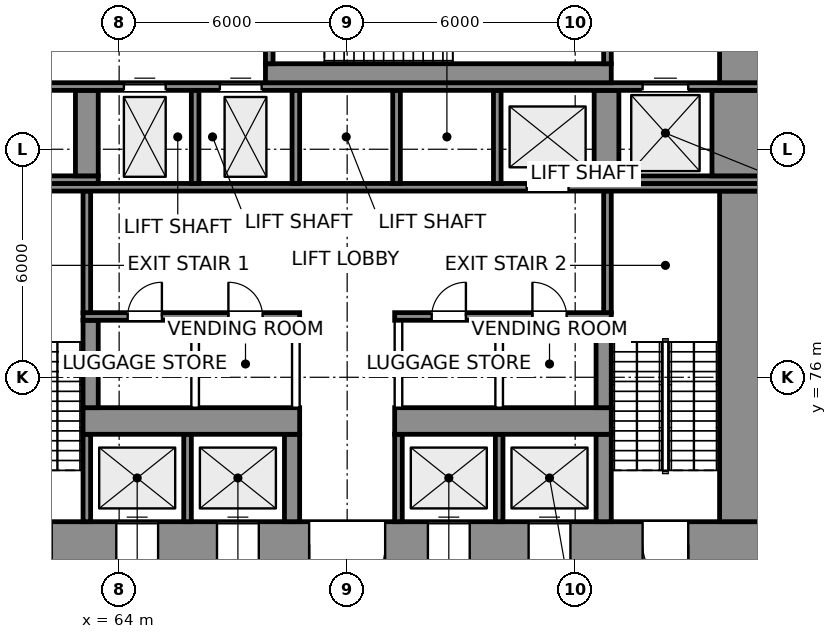
"""IFC4 building model, lengths in metres.
Left out: names, types, materials, properties, quantities, classifications, styles, units other than length and angle.
Written with IfcOpenShell. Run it as: python <this file> out.ifc"""

import sys

from ifc_helpers import new_model, si_unit, direction, frame, frame_2d, origin, place, context, subcontext, project, spatial, rectangle, extrude, element, fill, save


model = new_model("IFC4")
c1 = context("Model", 3, precision=1e-05, world=origin(), true_north=direction((0.0, 1.0)))
c2 = subcontext(c1, "Body", "Model", "MODEL_VIEW")
j1 = project(units=[si_unit("LENGTHUNIT", "METRE"), si_unit("PLANEANGLEUNIT", "RADIAN")], contexts=[c1])
p1 = place(None, origin())
s1 = spatial("IfcSite", under=j1, at=p1, CompositionType="ELEMENT")
p2 = place(p1, origin())
s2 = spatial("IfcBuilding", under=s1, at=p2, CompositionType="ELEMENT")
p3 = place(p2, frame((0.0, 0.0, 34.0)))
s3 = spatial("IfcBuildingStorey", under=s2, at=p3, CompositionType="ELEMENT", Elevation=34.0)
p4 = place(p3, frame((59.0, 71.6, 0.0), z_axis=(0.0, 0.0, 1.0), x_axis=(1.0, 0.0, 0.0)))
e1 = element("IfcWall", 1, at=p4, inside=s3, PredefinedType="SHEAR", context=c2, shape_type="SweptSolid", body=[
    extrude(rectangle(XDim=22.0, YDim=1.2, at=frame_2d((11.0, 0.0))), origin(), (0.0, 0.0, 1.0), 5.0),
])
p5 = place(p4, frame((2.025, 0.0, 0.0)))
e2 = element("IfcOpeningElement", 2, at=p5, cuts=e1, PredefinedType="OPENING", context=c2, shape_type="SweptSolid", body=[
    extrude(rectangle(XDim=1.2, YDim=2.1, at=frame_2d((0.6, 1.05))), frame((0.0, 0.61, 0.0), z_axis=(0.0, -1.0, 0.0), x_axis=(1.0, 0.0, 0.0)), (0.0, 0.0, 1.0), 1.22),
])
p6 = place(p4, frame((18.775, 0.0, 0.0)))
e3 = element("IfcOpeningElement", 3, at=p6, cuts=e1, PredefinedType="OPENING", context=c2, shape_type="SweptSolid", body=[
    extrude(rectangle(XDim=1.2, YDim=2.1, at=frame_2d((0.6, 1.05))), frame((0.0, 0.61, 0.0), z_axis=(0.0, -1.0, 0.0), x_axis=(1.0, 0.0, 0.0)), (0.0, 0.0, 1.0), 1.22),
])
p7 = place(p4, frame((10.0, 0.0, 0.0)))
e4 = element("IfcOpeningElement", 4, at=p7, cuts=e1, PredefinedType="OPENING", context=c2, shape_type="SweptSolid", body=[
    extrude(rectangle(XDim=2.0, YDim=2.1, at=frame_2d((1.0, 1.05))), frame((0.0, 0.61, 0.0), z_axis=(0.0, -1.0, 0.0), x_axis=(1.0, 0.0, 0.0)), (0.0, 0.0, 1.0), 1.22),
])
p8 = place(p4, frame((4.925, 0.0, 0.0)))
e5 = element("IfcOpeningElement", 5, at=p8, cuts=e1, PredefinedType="OPENING", context=c2, shape_type="SweptSolid", body=[
    extrude(rectangle(XDim=1.1, YDim=2.1, at=frame_2d((0.55, 1.05))), frame((0.0, 0.61, 0.0), z_axis=(0.0, -1.0, 0.0), x_axis=(1.0, 0.0, 0.0)), (0.0, 0.0, 1.0), 1.22),
])
p9 = place(p4, frame((7.575, 0.0, 0.0)))
e6 = element("IfcOpeningElement", 6, at=p9, cuts=e1, PredefinedType="OPENING", context=c2, shape_type="SweptSolid", body=[
    extrude(rectangle(XDim=1.1, YDim=2.1, at=frame_2d((0.55, 1.05))), frame((0.0, 0.61, 0.0), z_axis=(0.0, -1.0, 0.0), x_axis=(1.0, 0.0, 0.0)), (0.0, 0.0, 1.0), 1.22),
])
p10 = place(p4, frame((13.125, 0.0, 0.0)))
e7 = element("IfcOpeningElement", 7, at=p10, cuts=e1, PredefinedType="OPENING", context=c2, shape_type="SweptSolid", body=[
    extrude(rectangle(XDim=1.1, YDim=2.1, at=frame_2d((0.55, 1.05))), frame((0.0, 0.61, 0.0), z_axis=(0.0, -1.0, 0.0), x_axis=(1.0, 0.0, 0.0)), (0.0, 0.0, 1.0), 1.22),
])
p11 = place(p4, frame((15.775, 0.0, 0.0)))
e8 = element("IfcOpeningElement", 8, at=p11, cuts=e1, PredefinedType="OPENING", context=c2, shape_type="SweptSolid", body=[
    extrude(rectangle(XDim=1.1, YDim=2.1, at=frame_2d((0.55, 1.05))), frame((0.0, 0.61, 0.0), z_axis=(0.0, -1.0, 0.0), x_axis=(1.0, 0.0, 0.0)), (0.0, 0.0, 1.0), 1.22),
])
for number, where, z_axis, x_axis in (
    (9, (63.15, 72.2, 0.0), (0.0, 0.0, 1.0), (0.0, 1.0, 0.0)),
    (10, (65.8, 72.2, 0.0), (0.0, 0.0, 1.0), (0.0, 1.0, 0.0)),
):
    element("IfcWall", number, at=place(p3, frame(where, z_axis=z_axis, x_axis=x_axis)), inside=s3, PredefinedType="SHEAR", context=c2, shape_type="SweptSolid", body=[
        extrude(rectangle(XDim=2.3, YDim=0.2, at=frame_2d((1.15, 0.0))), origin(), (0.0, 0.0, 1.0), 5.0),
    ])
p12 = place(p3, frame((68.55, 72.2, 0.0), z_axis=(0.0, 0.0, 1.0), x_axis=(0.0, 1.0, 0.0)))
e11 = element("IfcWall", 11, at=p12, inside=s3, PredefinedType="SHEAR", context=c2, shape_type="SweptSolid", body=[
    extrude(rectangle(XDim=2.3, YDim=0.4, at=frame_2d((1.15, 0.0))), origin(), (0.0, 0.0, 1.0), 5.0),
])
for number, where, z_axis, x_axis in (
    (12, (71.35, 72.2, 0.0), (0.0, 0.0, 1.0), (0.0, 1.0, 0.0)),
    (13, (74.0, 72.2, 0.0), (0.0, 0.0, 1.0), (0.0, 1.0, 0.0)),
):
    element("IfcWall", number, at=place(p3, frame(where, z_axis=z_axis, x_axis=x_axis)), inside=s3, PredefinedType="SHEAR", context=c2, shape_type="SweptSolid", body=[
        extrude(rectangle(XDim=2.3, YDim=0.2, at=frame_2d((1.15, 0.0))), origin(), (0.0, 0.0, 1.0), 5.0),
    ])
p13 = place(p3, frame((76.75, 72.2, 0.0), z_axis=(0.0, 0.0, 1.0), x_axis=(0.0, 1.0, 0.0)))
e14 = element("IfcWall", 14, at=p13, inside=s3, PredefinedType="SHEAR", context=c2, shape_type="SweptSolid", body=[
    extrude(rectangle(XDim=2.3, YDim=0.4, at=frame_2d((1.15, 0.0))), origin(), (0.0, 0.0, 1.0), 5.0),
])
p14 = place(p3, frame((80.4, 72.2, 0.0), z_axis=(0.0, 0.0, 1.0), x_axis=(0.0, 1.0, 0.0)))
e15 = element("IfcWall", 15, at=p14, inside=s3, PredefinedType="SHEAR", context=c2, shape_type="SweptSolid", body=[
    extrude(rectangle(XDim=8.7, YDim=1.2, at=frame_2d((4.35, 0.0))), origin(), (0.0, 0.0, 1.0), 5.0),
])
for number, where, z_axis, x_axis in (
    (16, (63.05, 74.85, 0.0), (0.0, 0.0, 1.0), (1.0, 0.0, 0.0)),
    (17, (71.25, 74.85, 0.0), (0.0, 0.0, 1.0), (1.0, 0.0, 0.0)),
):
    element("IfcWall", number, at=place(p3, frame(where, z_axis=z_axis, x_axis=x_axis)), inside=s3, PredefinedType="SHEAR", context=c2, shape_type="SweptSolid", body=[
        extrude(rectangle(XDim=5.7, YDim=0.7, at=frame_2d((2.85, 0.0))), origin(), (0.0, 0.0, 1.0), 5.0),
    ])
p15 = place(p3, frame((63.25, 75.2, 0.0), z_axis=(0.0, 0.0, 1.0), x_axis=(0.0, 1.0, 0.0)))
e18 = element("IfcWall", 18, at=p15, inside=s3, PredefinedType="SHEAR", context=c2, shape_type="SweptSolid", body=[
    extrude(rectangle(XDim=2.3, YDim=0.4, at=frame_2d((1.15, 0.0))), origin(), (0.0, 0.0, 1.0), 5.0),
])
for number, where, z_axis, x_axis in (
    (19, (66.0, 75.2, 0.0), (0.0, 0.0, 1.0), (0.0, 1.0, 0.0)),
    (20, (68.65, 75.2, 0.0), (0.0, 0.0, 1.0), (0.0, 1.0, 0.0)),
    (21, (71.35, 75.2, 0.0), (0.0, 0.0, 1.0), (0.0, 1.0, 0.0)),
    (22, (74.0, 75.2, 0.0), (0.0, 0.0, 1.0), (0.0, 1.0, 0.0)),
):
    element("IfcWall", number, at=place(p3, frame(where, z_axis=z_axis, x_axis=x_axis)), inside=s3, PredefinedType="PARTITIONING", context=c2, shape_type="SweptSolid", body=[
        extrude(rectangle(XDim=2.3, YDim=0.2, at=frame_2d((1.15, 0.0))), origin(), (0.0, 0.0, 1.0), 4.6),
    ])
p16 = place(p3, frame((76.75, 75.2, 0.0), z_axis=(0.0, 0.0, 1.0), x_axis=(0.0, 1.0, 0.0)))
e23 = element("IfcWall", 23, at=p16, inside=s3, PredefinedType="SHEAR", context=c2, shape_type="SweptSolid", body=[
    extrude(rectangle(XDim=2.3, YDim=0.4, at=frame_2d((1.15, 0.0))), origin(), (0.0, 0.0, 1.0), 5.0),
])
p17 = place(p3, frame((63.05, 77.6, 0.0), z_axis=(0.0, 0.0, 1.0), x_axis=(1.0, 0.0, 0.0)))
e24 = element("IfcWall", 24, at=p17, inside=s3, PredefinedType="SHEAR", context=c2, shape_type="SweptSolid", body=[
    extrude(rectangle(XDim=5.7, YDim=0.2, at=frame_2d((2.85, 0.0))), origin(), (0.0, 0.0, 1.0), 5.0),
])
p18 = place(p17, frame((1.175, 0.0, 0.0)))
e25 = element("IfcOpeningElement", 25, at=p18, cuts=e24, PredefinedType="OPENING", context=c2, shape_type="SweptSolid", body=[
    extrude(rectangle(XDim=0.9, YDim=2.1, at=frame_2d((0.45, 1.05))), frame((0.0, 0.11, 0.0), z_axis=(0.0, -1.0, 0.0), x_axis=(1.0, 0.0, 0.0)), (0.0, 0.0, 1.0), 0.22),
])
p19 = place(p17, frame((3.825, 0.0, 0.0)))
e26 = element("IfcOpeningElement", 26, at=p19, cuts=e24, PredefinedType="OPENING", context=c2, shape_type="SweptSolid", body=[
    extrude(rectangle(XDim=0.9, YDim=2.1, at=frame_2d((0.45, 1.05))), frame((0.0, 0.11, 0.0), z_axis=(0.0, -1.0, 0.0), x_axis=(1.0, 0.0, 0.0)), (0.0, 0.0, 1.0), 0.22),
])
p20 = place(p3, frame((71.25, 77.6, 0.0), z_axis=(0.0, 0.0, 1.0), x_axis=(1.0, 0.0, 0.0)))
e27 = element("IfcWall", 27, at=p20, inside=s3, PredefinedType="SHEAR", context=c2, shape_type="SweptSolid", body=[
    extrude(rectangle(XDim=5.7, YDim=0.2, at=frame_2d((2.85, 0.0))), origin(), (0.0, 0.0, 1.0), 5.0),
])
p21 = place(p20, frame((0.975, 0.0, 0.0)))
e28 = element("IfcOpeningElement", 28, at=p21, cuts=e27, PredefinedType="OPENING", context=c2, shape_type="SweptSolid", body=[
    extrude(rectangle(XDim=0.9, YDim=2.1, at=frame_2d((0.45, 1.05))), frame((0.0, 0.11, 0.0), z_axis=(0.0, -1.0, 0.0), x_axis=(1.0, 0.0, 0.0)), (0.0, 0.0, 1.0), 0.22),
])
p22 = place(p20, frame((3.625, 0.0, 0.0)))
e29 = element("IfcOpeningElement", 29, at=p22, cuts=e27, PredefinedType="OPENING", context=c2, shape_type="SweptSolid", body=[
    extrude(rectangle(XDim=0.9, YDim=2.1, at=frame_2d((0.45, 1.05))), frame((0.0, 0.11, 0.0), z_axis=(0.0, -1.0, 0.0), x_axis=(1.0, 0.0, 0.0)), (0.0, 0.0, 1.0), 0.22),
])
for number, where, z_axis, x_axis in (
    (30, (63.15, 77.7, 0.0), (0.0, 0.0, 1.0), (0.0, 1.0, 0.0)),
    (31, (76.85, 77.7, 0.0), (0.0, 0.0, 1.0), (0.0, 1.0, 0.0)),
):
    element("IfcWall", number, at=place(p3, frame(where, z_axis=z_axis, x_axis=x_axis)), inside=s3, PredefinedType="SHEAR", context=c2, shape_type="SweptSolid", body=[
        extrude(rectangle(XDim=3.2, YDim=0.2, at=frame_2d((1.6, 0.0))), origin(), (0.0, 0.0, 1.0), 5.0),
    ])
p23 = place(p3, frame((59.0, 81.0, 0.0), z_axis=(0.0, 0.0, 1.0), x_axis=(1.0, 0.0, 0.0)))
e32 = element("IfcWall", 32, at=p23, inside=s3, PredefinedType="SHEAR", context=c2, shape_type="SweptSolid", body=[
    extrude(rectangle(XDim=22.0, YDim=0.2, at=frame_2d((11.0, 0.0))), origin(), (0.0, 0.0, 1.0), 5.0),
])
p24 = place(p23, frame((15.725, 0.0, 0.0)))
e33 = element("IfcOpeningElement", 33, at=p24, cuts=e32, PredefinedType="OPENING", context=c2, shape_type="SweptSolid", body=[
    extrude(rectangle(XDim=1.1, YDim=2.1, at=frame_2d((0.55, 1.05))), frame((0.0, 0.11, 0.0), z_axis=(0.0, -1.0, 0.0), x_axis=(1.0, 0.0, 0.0)), (0.0, 0.0, 1.0), 0.22),
])
p25 = place(p3, frame((59.0, 81.2, 0.0), z_axis=(0.0, 0.0, 1.0), x_axis=(1.0, 0.0, 0.0)))
e34 = element("IfcWall", 34, at=p25, inside=s3, PredefinedType="SHEAR", context=c2, shape_type="SweptSolid", body=[
    extrude(rectangle(XDim=4.45, YDim=0.2, at=frame_2d((2.225, 0.0))), origin(), (0.0, 0.0, 1.0), 5.0),
])
for number, where, z_axis, x_axis in (
    (35, (66.0, 81.1, 0.0), (0.0, 0.0, 1.0), (0.0, 1.0, 0.0)),
    (36, (68.65, 81.1, 0.0), (0.0, 0.0, 1.0), (0.0, 1.0, 0.0)),
    (37, (71.3, 81.1, 0.0), (0.0, 0.0, 1.0), (0.0, 1.0, 0.0)),
    (38, (73.95, 81.1, 0.0), (0.0, 0.0, 1.0), (0.0, 1.0, 0.0)),
):
    element("IfcWall", number, at=place(p3, frame(where, z_axis=z_axis, x_axis=x_axis)), inside=s3, PredefinedType="SHEAR", context=c2, shape_type="SweptSolid", body=[
        extrude(rectangle(XDim=2.45, YDim=0.2, at=frame_2d((1.225, 0.0))), origin(), (0.0, 0.0, 1.0), 5.0),
    ])
p26 = place(p3, frame((76.5, 81.2, 0.0), z_axis=(0.0, 0.0, 1.0), x_axis=(1.0, 0.0, 0.0)))
e39 = element("IfcWall", 39, at=p26, inside=s3, PredefinedType="SHEAR", context=c2, shape_type="SweptSolid", body=[
    extrude(rectangle(XDim=4.5, YDim=0.2, at=frame_2d((2.25, 0.0))), origin(), (0.0, 0.0, 1.0), 5.0),
])
p27 = place(p3, frame((63.15, 81.3, 0.0), z_axis=(0.0, 0.0, 1.0), x_axis=(0.0, 1.0, 0.0)))
e40 = element("IfcWall", 40, at=p27, inside=s3, PredefinedType="SHEAR", context=c2, shape_type="SweptSolid", body=[
    extrude(rectangle(XDim=2.25, YDim=0.6, at=frame_2d((1.125, 0.0))), origin(), (0.0, 0.0, 1.0), 5.0),
])
p28 = place(p3, frame((76.825, 81.3, 0.0), z_axis=(0.0, 0.0, 1.0), x_axis=(0.0, 1.0, 0.0)))
e41 = element("IfcWall", 41, at=p28, inside=s3, PredefinedType="SHEAR", context=c2, shape_type="SweptSolid", body=[
    extrude(rectangle(XDim=2.25, YDim=0.65, at=frame_2d((1.125, 0.0))), origin(), (0.0, 0.0, 1.0), 5.0),
])
p29 = place(p3, frame((80.3, 81.3, 0.0), z_axis=(0.0, 0.0, 1.0), x_axis=(0.0, 1.0, 0.0)))
e42 = element("IfcWall", 42, at=p29, inside=s3, PredefinedType="SHEAR", context=c2, shape_type="SweptSolid", body=[
    extrude(rectangle(XDim=2.25, YDim=1.4, at=frame_2d((1.125, 0.0))), origin(), (0.0, 0.0, 1.0), 5.0),
])
p30 = place(p3, frame((59.0, 83.65, 0.0), z_axis=(0.0, 0.0, 1.0), x_axis=(1.0, 0.0, 0.0)))
e43 = element("IfcWall", 43, at=p30, inside=s3, PredefinedType="SHEAR", context=c2, shape_type="SweptSolid", body=[
    extrude(rectangle(XDim=22.0, YDim=0.2, at=frame_2d((11.0, 0.0))), origin(), (0.0, 0.0, 1.0), 5.0),
])
p31 = place(p30, frame((5.125, 0.0, 0.0)))
e44 = element("IfcOpeningElement", 44, at=p31, cuts=e43, PredefinedType="OPENING", context=c2, shape_type="SweptSolid", body=[
    extrude(rectangle(XDim=1.1, YDim=2.1, at=frame_2d((0.55, 1.05))), frame((0.0, 0.11, 0.0), z_axis=(0.0, -1.0, 0.0), x_axis=(1.0, 0.0, 0.0)), (0.0, 0.0, 1.0), 0.22),
])
p32 = place(p30, frame((7.65, 0.0, 0.0)))
e45 = element("IfcOpeningElement", 45, at=p32, cuts=e43, PredefinedType="OPENING", context=c2, shape_type="SweptSolid", body=[
    extrude(rectangle(XDim=1.1, YDim=2.1, at=frame_2d((0.55, 1.05))), frame((0.0, 0.11, 0.0), z_axis=(0.0, -1.0, 0.0), x_axis=(1.0, 0.0, 0.0)), (0.0, 0.0, 1.0), 0.22),
])
p33 = place(p30, frame((18.775, 0.0, 0.0)))
e46 = element("IfcOpeningElement", 46, at=p33, cuts=e43, PredefinedType="OPENING", context=c2, shape_type="SweptSolid", body=[
    extrude(rectangle(XDim=1.2, YDim=2.1, at=frame_2d((0.6, 1.05))), frame((0.0, 0.11, 0.0), z_axis=(0.0, -1.0, 0.0), x_axis=(1.0, 0.0, 0.0)), (0.0, 0.0, 1.0), 0.22),
])
p34 = place(p30, frame((2.075, 0.0, 0.0)))
e47 = element("IfcOpeningElement", 47, at=p34, cuts=e43, PredefinedType="OPENING", context=c2, shape_type="SweptSolid", body=[
    extrude(rectangle(XDim=1.1, YDim=2.1, at=frame_2d((0.55, 1.05))), frame((0.0, 0.11, 0.0), z_axis=(0.0, -1.0, 0.0), x_axis=(1.0, 0.0, 0.0)), (0.0, 0.0, 1.0), 0.22),
])
p35 = place(p3, frame((67.85, 84.0, 0.0), z_axis=(0.0, 0.0, 1.0), x_axis=(1.0, 0.0, 0.0)))
e48 = element("IfcWall", 48, at=p35, inside=s3, PredefinedType="SHEAR", context=c2, shape_type="SweptSolid", body=[
    extrude(rectangle(XDim=9.1, YDim=0.5, at=frame_2d((4.55, 0.0))), origin(), (0.0, 0.0, 1.0), 5.0),
])
p36 = place(p3, frame((80.4, 83.75, 0.0), z_axis=(0.0, 0.0, 1.0), x_axis=(0.0, 1.0, 0.0)))
e49 = element("IfcWall", 49, at=p36, inside=s3, PredefinedType="SHEAR", context=c2, shape_type="SweptSolid", body=[
    extrude(rectangle(XDim=3.05, YDim=1.2, at=frame_2d((1.525, 0.0))), origin(), (0.0, 0.0, 1.0), 5.0),
])
p37 = place(p36, frame((0.925, 0.0, 0.0)))
e50 = element("IfcOpeningElement", 50, at=p37, cuts=e49, PredefinedType="OPENING", context=c2, shape_type="SweptSolid", body=[
    extrude(rectangle(XDim=1.2, YDim=2.1, at=frame_2d((0.6, 1.05))), frame((0.0, 0.61, 0.0), z_axis=(0.0, -1.0, 0.0), x_axis=(1.0, 0.0, 0.0)), (0.0, 0.0, 1.0), 1.22),
])
p38 = place(p3, frame((67.95, 84.25, 0.0), z_axis=(0.0, 0.0, 1.0), x_axis=(0.0, 1.0, 0.0)))
e51 = element("IfcWall", 51, at=p38, inside=s3, PredefinedType="SHEAR", context=c2, shape_type="SweptSolid", body=[
    extrude(rectangle(XDim=2.55, YDim=0.2, at=frame_2d((1.275, 0.0))), origin(), (0.0, 0.0, 1.0), 5.0),
])
p39 = place(p38, frame((0.825, 0.0, 0.0)))
e52 = element("IfcOpeningElement", 52, at=p39, cuts=e51, PredefinedType="OPENING", context=c2, shape_type="SweptSolid", body=[
    extrude(rectangle(XDim=1.2, YDim=2.1, at=frame_2d((0.6, 1.05))), frame((0.0, 0.11, 0.0), z_axis=(0.0, -1.0, 0.0), x_axis=(1.0, 0.0, 0.0)), (0.0, 0.0, 1.0), 0.22),
])
p40 = place(p3, frame((76.85, 84.25, 0.0), z_axis=(0.0, 0.0, 1.0), x_axis=(0.0, 1.0, 0.0)))
e53 = element("IfcWall", 53, at=p40, inside=s3, PredefinedType="SHEAR", context=c2, shape_type="SweptSolid", body=[
    extrude(rectangle(XDim=2.55, YDim=0.2, at=frame_2d((1.275, 0.0))), origin(), (0.0, 0.0, 1.0), 5.0),
])
p41 = place(p6, frame((1.2, 0.0, 0.0), z_axis=(0.0, 0.0, 1.0), x_axis=(-1.0, 0.0, 0.0)))
e54 = element("IfcDoor", 54, at=p41, inside=s3, OperationType="SINGLE_SWING_LEFT", PredefinedType="DOOR", context=c2, shape_type="SweptSolid", body=[
    extrude(rectangle(XDim=1.2, YDim=2.1, at=frame_2d((0.6, 1.05))), frame((0.0, 0.025, 0.0), z_axis=(0.0, -1.0, 0.0), x_axis=(1.0, 0.0, 0.0)), (0.0, 0.0, 1.0), 0.05),
])
fill(e3, e54)
p42 = place(p7, frame((2.0, 0.0, 0.0), z_axis=(0.0, 0.0, 1.0), x_axis=(-1.0, 0.0, 0.0)))
e55 = element("IfcDoor", 55, at=p42, inside=s3, OperationType="DOUBLE_DOOR_SINGLE_SWING", PredefinedType="DOOR", context=c2, shape_type="SweptSolid", body=[
    extrude(rectangle(XDim=2.0, YDim=2.1, at=frame_2d((1.0, 1.05))), frame((0.0, 0.025, 0.0), z_axis=(0.0, -1.0, 0.0), x_axis=(1.0, 0.0, 0.0)), (0.0, 0.0, 1.0), 0.05),
])
fill(e4, e55)
p43 = place(p31, origin())
e56 = element("IfcDoor", 56, at=p43, inside=s3, OperationType="DOUBLE_DOOR_SLIDING", PredefinedType="DOOR", context=c2, shape_type="SweptSolid", body=[
    extrude(rectangle(XDim=1.1, YDim=2.1, at=frame_2d((0.55, 1.05))), frame((0.0, 0.025, 0.0), z_axis=(0.0, -1.0, 0.0), x_axis=(1.0, 0.0, 0.0)), (0.0, 0.0, 1.0), 0.05),
])
fill(e44, e56)
p44 = place(p32, origin())
e57 = element("IfcDoor", 57, at=p44, inside=s3, OperationType="DOUBLE_DOOR_SLIDING", PredefinedType="DOOR", context=c2, shape_type="SweptSolid", body=[
    extrude(rectangle(XDim=1.1, YDim=2.1, at=frame_2d((0.55, 1.05))), frame((0.0, 0.025, 0.0), z_axis=(0.0, -1.0, 0.0), x_axis=(1.0, 0.0, 0.0)), (0.0, 0.0, 1.0), 0.05),
])
fill(e45, e57)
p45 = place(p24, origin())
e58 = element("IfcDoor", 58, at=p45, inside=s3, OperationType="DOUBLE_DOOR_SLIDING", PredefinedType="DOOR", context=c2, shape_type="SweptSolid", body=[
    extrude(rectangle(XDim=1.1, YDim=2.1, at=frame_2d((0.55, 1.05))), frame((0.0, 0.025, 0.0), z_axis=(0.0, -1.0, 0.0), x_axis=(1.0, 0.0, 0.0)), (0.0, 0.0, 1.0), 0.05),
])
fill(e33, e58)
p46 = place(p8, origin())
e59 = element("IfcDoor", 59, at=p46, inside=s3, OperationType="DOUBLE_DOOR_SLIDING", PredefinedType="DOOR", context=c2, shape_type="SweptSolid", body=[
    extrude(rectangle(XDim=1.1, YDim=2.1, at=frame_2d((0.55, 1.05))), frame((0.0, 0.025, 0.0), z_axis=(0.0, -1.0, 0.0), x_axis=(1.0, 0.0, 0.0)), (0.0, 0.0, 1.0), 0.05),
])
fill(e5, e59)
p47 = place(p9, origin())
e60 = element("IfcDoor", 60, at=p47, inside=s3, OperationType="DOUBLE_DOOR_SLIDING", PredefinedType="DOOR", context=c2, shape_type="SweptSolid", body=[
    extrude(rectangle(XDim=1.1, YDim=2.1, at=frame_2d((0.55, 1.05))), frame((0.0, 0.025, 0.0), z_axis=(0.0, -1.0, 0.0), x_axis=(1.0, 0.0, 0.0)), (0.0, 0.0, 1.0), 0.05),
])
fill(e6, e60)
p48 = place(p10, origin())
e61 = element("IfcDoor", 61, at=p48, inside=s3, OperationType="DOUBLE_DOOR_SLIDING", PredefinedType="DOOR", context=c2, shape_type="SweptSolid", body=[
    extrude(rectangle(XDim=1.1, YDim=2.1, at=frame_2d((0.55, 1.05))), frame((0.0, 0.025, 0.0), z_axis=(0.0, -1.0, 0.0), x_axis=(1.0, 0.0, 0.0)), (0.0, 0.0, 1.0), 0.05),
])
fill(e7, e61)
p49 = place(p11, origin())
e62 = element("IfcDoor", 62, at=p49, inside=s3, OperationType="DOUBLE_DOOR_SLIDING", PredefinedType="DOOR", context=c2, shape_type="SweptSolid", body=[
    extrude(rectangle(XDim=1.1, YDim=2.1, at=frame_2d((0.55, 1.05))), frame((0.0, 0.025, 0.0), z_axis=(0.0, -1.0, 0.0), x_axis=(1.0, 0.0, 0.0)), (0.0, 0.0, 1.0), 0.05),
])
fill(e8, e62)
p50 = place(p33, origin())
e63 = element("IfcDoor", 63, at=p50, inside=s3, OperationType="DOUBLE_DOOR_SLIDING", PredefinedType="DOOR", context=c2, shape_type="SweptSolid", body=[
    extrude(rectangle(XDim=1.2, YDim=2.1, at=frame_2d((0.6, 1.05))), frame((0.0, 0.025, 0.0), z_axis=(0.0, -1.0, 0.0), x_axis=(1.0, 0.0, 0.0)), (0.0, 0.0, 1.0), 0.05),
])
fill(e46, e63)
p51 = place(p18, origin())
e64 = element("IfcDoor", 64, at=p51, inside=s3, OperationType="SINGLE_SWING_RIGHT", PredefinedType="DOOR", context=c2, shape_type="SweptSolid", body=[
    extrude(rectangle(XDim=0.9, YDim=2.1, at=frame_2d((0.45, 1.05))), frame((0.0, 0.025, 0.0), z_axis=(0.0, -1.0, 0.0), x_axis=(1.0, 0.0, 0.0)), (0.0, 0.0, 1.0), 0.05),
])
fill(e25, e64)
p52 = place(p19, origin())
e65 = element("IfcDoor", 65, at=p52, inside=s3, OperationType="SINGLE_SWING_LEFT", PredefinedType="DOOR", context=c2, shape_type="SweptSolid", body=[
    extrude(rectangle(XDim=0.9, YDim=2.1, at=frame_2d((0.45, 1.05))), frame((0.0, 0.025, 0.0), z_axis=(0.0, -1.0, 0.0), x_axis=(1.0, 0.0, 0.0)), (0.0, 0.0, 1.0), 0.05),
])
fill(e26, e65)
p53 = place(p21, origin())
e66 = element("IfcDoor", 66, at=p53, inside=s3, OperationType="SINGLE_SWING_RIGHT", PredefinedType="DOOR", context=c2, shape_type="SweptSolid", body=[
    extrude(rectangle(XDim=0.9, YDim=2.1, at=frame_2d((0.45, 1.05))), frame((0.0, 0.025, 0.0), z_axis=(0.0, -1.0, 0.0), x_axis=(1.0, 0.0, 0.0)), (0.0, 0.0, 1.0), 0.05),
])
fill(e28, e66)
p54 = place(p22, origin())
e67 = element("IfcDoor", 67, at=p54, inside=s3, OperationType="SINGLE_SWING_LEFT", PredefinedType="DOOR", context=c2, shape_type="SweptSolid", body=[
    extrude(rectangle(XDim=0.9, YDim=2.1, at=frame_2d((0.45, 1.05))), frame((0.0, 0.025, 0.0), z_axis=(0.0, -1.0, 0.0), x_axis=(1.0, 0.0, 0.0)), (0.0, 0.0, 1.0), 0.05),
])
fill(e29, e67)
save(model, sys.argv[1])
